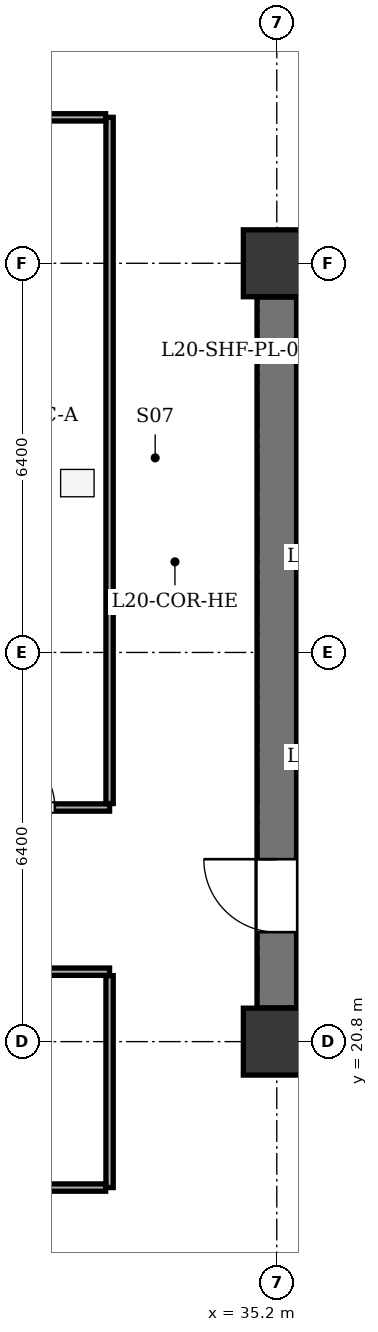
"""IFC4 building model, lengths in metres.
Left out: names, types, materials, properties, quantities, classifications, styles, units other than length and angle.
Written with IfcOpenShell. Run it as: python <this file> out.ifc"""

import sys

from ifc_helpers import new_model, si_unit, direction, frame, frame_2d, origin, origin_2d, place, context, subcontext, project, spatial, rectangle, extrude, element, fill, save


model = new_model("IFC4")
c1 = context("Model", 3, precision=1e-05, world=origin(), true_north=direction((0.0, 1.0)))
c2 = subcontext(c1, "Body", "Model", "MODEL_VIEW")
j1 = project(units=[si_unit("LENGTHUNIT", "METRE"), si_unit("PLANEANGLEUNIT", "RADIAN")], contexts=[c1])
p1 = place(None, origin())
s1 = spatial("IfcSite", under=j1, at=p1, CompositionType="ELEMENT")
p2 = place(p1, origin())
s2 = spatial("IfcBuilding", under=s1, at=p2, CompositionType="ELEMENT")
p3 = place(p2, frame((0.0, 0.0, 82.8)))
s3 = spatial("IfcBuildingStorey", under=s2, at=p3, CompositionType="ELEMENT", Elevation=82.8)
for number, where, z_axis, x_axis in (
    (1, (35.2, 20.8, 0.0), (0.0, 0.0, 1.0), (1.0, 0.0, 0.0)),
    (2, (35.2, 33.6, 0.0), (0.0, 0.0, 1.0), (1.0, 0.0, 0.0)),
):
    element("IfcColumn", number, at=place(p3, frame(where, z_axis=z_axis, x_axis=x_axis)), inside=s3, PredefinedType="COLUMN", context=c2, shape_type="SweptSolid", body=[
        extrude(rectangle(XDim=1.1, YDim=1.1, at=origin_2d()), origin(), (0.0, 0.0, 1.0), 3.9),
    ])
p4 = place(p3, frame((35.2, 21.355, 0.0), z_axis=(0.0, 0.0, 1.0), x_axis=(0.0, 1.0, 0.0)))
e3 = element("IfcWall", 3, at=p4, inside=s3, PredefinedType="SHEAR", context=c2, shape_type="SweptSolid", body=[
    extrude(rectangle(XDim=11.69, YDim=0.65, at=frame_2d((5.845, 0.0))), origin(), (0.0, 0.0, 1.0), 3.6),
])
p5 = place(p4, frame((1.245, 0.0, 0.0)))
e4 = element("IfcOpeningElement", 4, at=p5, cuts=e3, PredefinedType="OPENING", context=c2, shape_type="SweptSolid", body=[
    extrude(rectangle(XDim=1.2, YDim=2.15, at=frame_2d((0.6, 1.075))), frame((0.0, 0.335, 0.0), z_axis=(0.0, -1.0, 0.0), x_axis=(1.0, 0.0, 0.0)), (0.0, 0.0, 1.0), 0.67),
])
p6 = place(p3, frame((35.535, 25.15, 0.0), z_axis=(0.0, 0.0, 1.0), x_axis=(1.0, 0.0, 0.0)))
e5 = element("IfcWall", 5, at=p6, inside=s3, PredefinedType="SOLIDWALL", context=c2, shape_type="SweptSolid", body=[
    extrude(rectangle(XDim=3.865, YDim=0.2, at=frame_2d((1.933, 0.0))), origin(), (0.0, 0.0, 1.0), 3.6),
])
for number, where, z_axis, x_axis in (
    (6, (35.535, 27.12, 0.0), (0.0, 0.0, 1.0), (1.0, 0.0, 0.0)),
    (7, (35.535, 29.08, 0.0), (0.0, 0.0, 1.0), (1.0, 0.0, 0.0)),
):
    element("IfcWall", number, at=place(p3, frame(where, z_axis=z_axis, x_axis=x_axis)), inside=s3, PredefinedType="PARTITIONING", context=c2, shape_type="SweptSolid", body=[
        extrude(rectangle(XDim=2.245, YDim=0.18, at=frame_2d((1.123, 0.0))), origin(), (0.0, 0.0, 1.0), 3.6),
    ])
p7 = place(p3, frame((23.55, 24.65, 0.0), z_axis=(0.0, 0.0, 1.0), x_axis=(1.0, 0.0, 0.0)))
e8 = element("IfcWall", 8, at=p7, inside=s3, PredefinedType="PARTITIONING", context=c2, shape_type="SweptSolid", body=[
    extrude(rectangle(XDim=8.9, YDim=0.12, at=frame_2d((4.45, 0.0))), origin(), (0.0, 0.0, 1.0), 3.135),
])
p8 = place(p7, frame((1.0, 0.0, 0.0)))
e9 = element("IfcOpeningElement", 9, at=p8, cuts=e8, PredefinedType="OPENING", context=c2, shape_type="SweptSolid", body=[
    extrude(rectangle(XDim=0.95, YDim=2.1, at=frame_2d((0.475, 1.05))), frame((0.0, 0.07, 0.0), z_axis=(0.0, -1.0, 0.0), x_axis=(1.0, 0.0, 0.0)), (0.0, 0.0, 1.0), 0.14),
])
p9 = place(p7, frame((4.1, 0.0, 0.0)))
e10 = element("IfcOpeningElement", 10, at=p9, cuts=e8, PredefinedType="OPENING", context=c2, shape_type="SweptSolid", body=[
    extrude(rectangle(XDim=0.95, YDim=2.1, at=frame_2d((0.475, 1.05))), frame((0.0, 0.07, 0.0), z_axis=(0.0, -1.0, 0.0), x_axis=(1.0, 0.0, 0.0)), (0.0, 0.0, 1.0), 0.14),
])
p10 = place(p7, frame((7.0, 0.0, 0.0)))
e11 = element("IfcOpeningElement", 11, at=p10, cuts=e8, PredefinedType="OPENING", context=c2, shape_type="SweptSolid", body=[
    extrude(rectangle(XDim=1.0, YDim=2.1, at=frame_2d((0.5, 1.05))), frame((0.0, 0.07, 0.0), z_axis=(0.0, -1.0, 0.0), x_axis=(1.0, 0.0, 0.0)), (0.0, 0.0, 1.0), 0.14),
])
p11 = place(p3, frame((32.45, 24.715, 0.0), z_axis=(0.0, 0.0, 1.0), x_axis=(0.0, 1.0, 0.0)))
e12 = element("IfcWall", 12, at=p11, inside=s3, PredefinedType="PARTITIONING", context=c2, shape_type="SweptSolid", body=[
    extrude(rectangle(XDim=11.285, YDim=0.12, at=frame_2d((5.643, 0.0))), origin(), (0.0, 0.0, 1.0), 3.6),
])
p12 = place(p3, frame((23.615, 36.0, 0.0), z_axis=(0.0, 0.0, 1.0), x_axis=(1.0, 0.0, 0.0)))
e13 = element("IfcWall", 13, at=p12, inside=s3, PredefinedType="PARTITIONING", context=c2, shape_type="SweptSolid", body=[
    extrude(rectangle(XDim=8.77, YDim=0.12, at=frame_2d((4.385, 0.0))), origin(), (0.0, 0.0, 1.0), 3.6),
])
p13 = place(p3, frame((23.55, 21.95, 0.0), z_axis=(0.0, 0.0, 1.0), x_axis=(1.0, 0.0, 0.0)))
e14 = element("IfcWall", 14, at=p13, inside=s3, PredefinedType="PARTITIONING", context=c2, shape_type="SweptSolid", body=[
    extrude(rectangle(XDim=8.9, YDim=0.12, at=frame_2d((4.45, 0.0))), origin(), (0.0, 0.0, 1.0), 3.135),
])
p14 = place(p13, frame((3.6, 0.0, 0.0)))
e15 = element("IfcOpeningElement", 15, at=p14, cuts=e14, PredefinedType="OPENING", context=c2, shape_type="SweptSolid", body=[
    extrude(rectangle(XDim=1.1, YDim=2.15, at=frame_2d((0.55, 1.075))), frame((0.0, 0.07, 0.0), z_axis=(0.0, -1.0, 0.0), x_axis=(1.0, 0.0, 0.0)), (0.0, 0.0, 1.0), 0.14),
])
p15 = place(p3, frame((32.45, 18.4, 0.0), z_axis=(0.0, 0.0, 1.0), x_axis=(0.0, 1.0, 0.0)))
e16 = element("IfcWall", 16, at=p15, inside=s3, PredefinedType="PARTITIONING", context=c2, shape_type="SweptSolid", body=[
    extrude(rectangle(XDim=3.485, YDim=0.12, at=frame_2d((1.743, 0.0))), origin(), (0.0, 0.0, 1.0), 3.6),
])
p16 = place(p3, frame((23.615, 18.4, 0.0), z_axis=(0.0, 0.0, 1.0), x_axis=(1.0, 0.0, 0.0)))
e17 = element("IfcWall", 17, at=p16, inside=s3, PredefinedType="PARTITIONING", context=c2, shape_type="SweptSolid", body=[
    extrude(rectangle(XDim=8.77, YDim=0.12, at=frame_2d((4.385, 0.0))), origin(), (0.0, 0.0, 1.0), 3.6),
])
p17 = place(p5, origin())
e18 = element("IfcDoor", 18, at=p17, inside=s3, OperationType="SINGLE_SWING_RIGHT", PredefinedType="DOOR", context=c2, shape_type="SweptSolid", body=[
    extrude(rectangle(XDim=1.2, YDim=2.15, at=frame_2d((0.6, 1.075))), frame((0.0, 0.025, 0.0), z_axis=(0.0, -1.0, 0.0), x_axis=(1.0, 0.0, 0.0)), (0.0, 0.0, 1.0), 0.05),
])
fill(e4, e18)
p18 = place(p10, origin())
e19 = element("IfcDoor", 19, at=p18, inside=s3, OperationType="SINGLE_SWING_LEFT", PredefinedType="DOOR", context=c2, shape_type="SweptSolid", body=[
    extrude(rectangle(XDim=1.0, YDim=2.1, at=frame_2d((0.5, 1.05))), frame((0.0, 0.025, 0.0), z_axis=(0.0, -1.0, 0.0), x_axis=(1.0, 0.0, 0.0)), (0.0, 0.0, 1.0), 0.05),
])
fill(e11, e19)
save(model, sys.argv[1])
